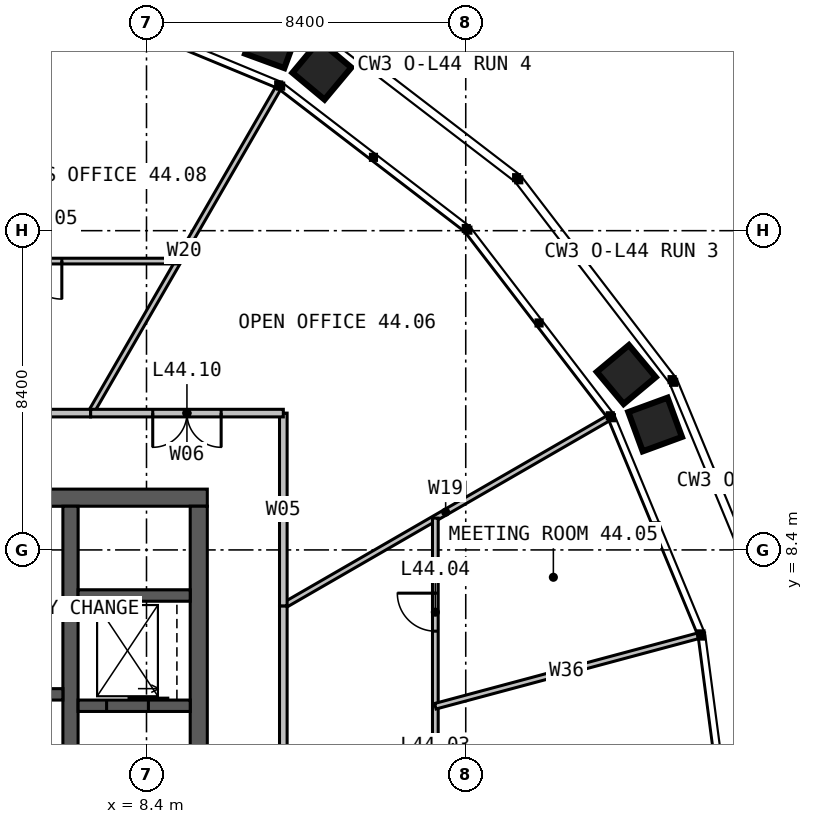
"""IFC4 building model, lengths in metres.
Left out: names, types, materials, properties, quantities, classifications, styles, units other than length and angle.
Written with IfcOpenShell. Run it as: python <this file> out.ifc"""

import sys

from ifc_helpers import new_model, si_unit, direction, frame, frame_2d, origin, place, context, subcontext, project, spatial, rectangle, extrude, element, fill, save


model = new_model("IFC4")
c1 = context("Model", 3, precision=1e-05, world=origin(), true_north=direction((0.0, 1.0)))
c2 = subcontext(c1, "Body", "Model", "MODEL_VIEW")
j1 = project(units=[si_unit("LENGTHUNIT", "METRE"), si_unit("PLANEANGLEUNIT", "RADIAN")], contexts=[c1])
p1 = place(None, origin())
s1 = spatial("IfcSite", under=j1, at=p1, CompositionType="ELEMENT")
p2 = place(p1, origin())
s2 = spatial("IfcBuilding", under=s1, at=p2, CompositionType="ELEMENT")
p3 = place(p2, frame((0.0, 0.0, 183.0)))
s3 = spatial("IfcBuildingStorey", under=s2, at=p3, CompositionType="ELEMENT", Elevation=183.0)
p4 = place(p3, frame((-10.0, 9.775, 0.0), z_axis=(0.0, 0.0, 1.0), x_axis=(1.0, 0.0, 0.0)))
e1 = element("IfcWall", 1, at=p4, inside=s3, PredefinedType="SOLIDWALL", context=c2, shape_type="SweptSolid", body=[
    extrude(rectangle(XDim=20.0, YDim=0.45, at=frame_2d((10.0, 0.0))), origin(), (0.0, 0.0, 1.0), 4.0),
])
p5 = place(p4, frame((9.4, 0.0, 0.0)))
e2 = element("IfcOpeningElement", 2, at=p5, cuts=e1, PredefinedType="OPENING", context=c2, shape_type="SweptSolid", body=[
    extrude(rectangle(XDim=1.2, YDim=2.2, at=frame_2d((0.6, 1.1))), frame((0.0, 0.235, 0.0), z_axis=(0.0, -1.0, 0.0), x_axis=(1.0, 0.0, 0.0)), (0.0, 0.0, 1.0), 0.47),
])
p6 = place(p3, frame((9.775, -9.55, 0.0), z_axis=(0.0, 0.0, 1.0), x_axis=(0.0, 1.0, 0.0)))
e3 = element("IfcWall", 3, at=p6, inside=s3, PredefinedType="SOLIDWALL", context=c2, shape_type="SweptSolid", body=[
    extrude(rectangle(XDim=19.1, YDim=0.45, at=frame_2d((9.55, 0.0))), origin(), (0.0, 0.0, 1.0), 4.0),
])
p7 = place(p3, frame((6.4, 9.55, 0.0), z_axis=(0.0, 0.0, 1.0), x_axis=(0.0, -1.0, 0.0)))
e4 = element("IfcWall", 4, at=p7, inside=s3, PredefinedType="SOLIDWALL", context=c2, shape_type="SweptSolid", body=[
    extrude(rectangle(XDim=19.1, YDim=0.4, at=frame_2d((9.55, 0.0))), origin(), (0.0, 0.0, 1.0), 4.0),
])
p8 = place(p7, frame((9.05, 0.0, 0.0)))
e5 = element("IfcOpeningElement", 5, at=p8, cuts=e4, PredefinedType="OPENING", context=c2, shape_type="SweptSolid", body=[
    extrude(rectangle(XDim=1.0, YDim=2.2, at=frame_2d((0.5, 1.1))), frame((0.0, 0.21, 0.0), z_axis=(0.0, -1.0, 0.0), x_axis=(1.0, 0.0, 0.0)), (0.0, 0.0, 1.0), 0.42),
])
p9 = place(p3, frame((1.35, 4.6, 0.0), z_axis=(0.0, 0.0, 1.0), x_axis=(1.0, 0.0, 0.0)))
e6 = element("IfcWall", 6, at=p9, inside=s3, PredefinedType="SOLIDWALL", context=c2, shape_type="SweptSolid", body=[
    extrude(rectangle(XDim=4.85, YDim=0.3, at=frame_2d((2.425, 0.0))), origin(), (0.0, 0.0, 1.0), 4.0),
])
p10 = place(p3, frame((6.6, 4.3, 0.0), z_axis=(0.0, 0.0, 1.0), x_axis=(1.0, 0.0, 0.0)))
e7 = element("IfcWall", 7, at=p10, inside=s3, PredefinedType="SOLIDWALL", context=c2, shape_type="SweptSolid", body=[
    extrude(rectangle(XDim=2.95, YDim=0.3, at=frame_2d((1.475, 0.0))), origin(), (0.0, 0.0, 1.0), 4.0),
])
p11 = place(p10, frame((0.75, 0.0, 0.0)))
e8 = element("IfcOpeningElement", 8, at=p11, cuts=e7, PredefinedType="OPENING", context=c2, shape_type="SweptSolid", body=[
    extrude(rectangle(XDim=1.1, YDim=2.2, at=frame_2d((0.55, 1.1))), frame((0.0, 0.16, 0.0), z_axis=(0.0, -1.0, 0.0), x_axis=(1.0, 0.0, 0.0)), (0.0, 0.0, 1.0), 0.32),
])
p12 = place(p3, frame((6.6, 7.2, 0.0), z_axis=(0.0, 0.0, 1.0), x_axis=(1.0, 0.0, 0.0)))
e9 = element("IfcWall", 9, at=p12, inside=s3, PredefinedType="SOLIDWALL", context=c2, shape_type="SweptSolid", body=[
    extrude(rectangle(XDim=2.95, YDim=0.3, at=frame_2d((1.475, 0.0))), origin(), (0.0, 0.0, 1.0), 4.0),
])
p13 = place(p3, frame((1.35, 6.8, 0.0), z_axis=(0.0, 0.0, 1.0), x_axis=(1.0, 0.0, 0.0)))
e10 = element("IfcWall", 10, at=p13, inside=s3, PredefinedType="PARTITIONING", context=c2, shape_type="SweptSolid", body=[
    extrude(rectangle(XDim=4.85, YDim=0.15, at=frame_2d((2.425, 0.0))), origin(), (0.0, 0.0, 1.0), 3.75),
])
for number, where, z_axis, x_axis in (
    (11, (12.0, 6.928, 0.0), (0.0, 0.0, 1.0), (0.866, 0.5, 0.0)),
    (12, (6.928, 12.0, 0.0), (0.0, 0.0, 1.0), (0.5, 0.866, 0.0)),
):
    element("IfcWall", number, at=place(p3, frame(where, z_axis=z_axis, x_axis=x_axis)), inside=s3, PredefinedType="PARTITIONING", context=c2, shape_type="SweptSolid", body=[
        extrude(rectangle(XDim=9.865, YDim=0.15, at=frame_2d((4.932, 0.0))), origin(), (0.0, 0.0, 1.0), 2.79),
    ])
p14 = place(p3, frame((16.0, -9.238, 0.0), z_axis=(0.0, 0.0, 1.0), x_axis=(0.0, 1.0, 0.0)))
e13 = element("IfcWall", 13, at=p14, inside=s3, PredefinedType="PARTITIONING", context=c2, shape_type="SweptSolid", body=[
    extrude(rectangle(XDim=18.475, YDim=0.15, at=frame_2d((9.238, 0.0))), origin(), (0.0, 0.0, 1.0), 2.79),
])
p15 = place(p14, frame((1.975, 0.0, 0.0)))
e14 = element("IfcOpeningElement", 14, at=p15, cuts=e13, PredefinedType="OPENING", context=c2, shape_type="SweptSolid", body=[
    extrude(rectangle(XDim=1.0, YDim=2.2, at=frame_2d((0.5, 1.1))), frame((0.0, 0.085, 0.0), z_axis=(0.0, -1.0, 0.0), x_axis=(1.0, 0.0, 0.0)), (0.0, 0.0, 1.0), 0.17),
])
p16 = place(p14, frame((6.594, 0.0, 0.0)))
e15 = element("IfcOpeningElement", 15, at=p16, cuts=e13, PredefinedType="OPENING", context=c2, shape_type="SweptSolid", body=[
    extrude(rectangle(XDim=1.0, YDim=2.2, at=frame_2d((0.5, 1.1))), frame((0.0, 0.085, 0.0), z_axis=(0.0, -1.0, 0.0), x_axis=(1.0, 0.0, 0.0)), (0.0, 0.0, 1.0), 0.17),
])
p17 = place(p14, frame((10.881, 0.0, 0.0)))
e16 = element("IfcOpeningElement", 16, at=p17, cuts=e13, PredefinedType="OPENING", context=c2, shape_type="SweptSolid", body=[
    extrude(rectangle(XDim=1.0, YDim=2.2, at=frame_2d((0.5, 1.1))), frame((0.0, 0.085, 0.0), z_axis=(0.0, -1.0, 0.0), x_axis=(1.0, 0.0, 0.0)), (0.0, 0.0, 1.0), 0.17),
])
p18 = place(p14, frame((15.5, 0.0, 0.0)))
e17 = element("IfcOpeningElement", 17, at=p18, cuts=e13, PredefinedType="OPENING", context=c2, shape_type="SweptSolid", body=[
    extrude(rectangle(XDim=1.0, YDim=2.2, at=frame_2d((0.5, 1.1))), frame((0.0, 0.085, 0.0), z_axis=(0.0, -1.0, 0.0), x_axis=(1.0, 0.0, 0.0)), (0.0, 0.0, 1.0), 0.17),
])
p19 = place(p3, frame((16.0, 4.287, 0.0), z_axis=(0.0, 0.0, 1.0), x_axis=(0.965925667522, 0.25881963763, 0.0)))
e18 = element("IfcWall", 18, at=p19, inside=s3, PredefinedType="PARTITIONING", context=c2, shape_type="SweptSolid", body=[
    extrude(rectangle(XDim=7.157, YDim=0.15, at=frame_2d((3.578, 0.0))), origin(), (0.0, 0.0, 1.0), 2.79),
])
p20 = place(p3, frame((12.0, -6.928, 0.0), z_axis=(0.0, 0.0, 1.0), x_axis=(0.0, 1.0, 0.0)))
e19 = element("IfcWall", 19, at=p20, inside=s3, PredefinedType="PARTITIONING", context=c2, shape_type="SweptSolid", body=[
    extrude(rectangle(XDim=13.856, YDim=0.2, at=frame_2d((6.928, 0.0))), origin(), (0.0, 0.0, 1.0), 3.8),
])
p21 = place(p20, frame((6.028, 0.0, 0.0)))
e20 = element("IfcOpeningElement", 20, at=p21, cuts=e19, PredefinedType="OPENING", context=c2, shape_type="SweptSolid", body=[
    extrude(rectangle(XDim=1.8, YDim=2.2, at=frame_2d((0.9, 1.1))), frame((0.0, 0.11, 0.0), z_axis=(0.0, -1.0, 0.0), x_axis=(1.0, 0.0, 0.0)), (0.0, 0.0, 1.0), 0.22),
])
p22 = place(p3, frame((12.0, 6.928, 0.0), z_axis=(0.0, 0.0, 1.0), x_axis=(0.0, 1.0, 0.0)))
e21 = element("IfcWall", 21, at=p22, inside=s3, PredefinedType="PARTITIONING", context=c2, shape_type="SweptSolid", body=[
    extrude(rectangle(XDim=5.072, YDim=0.2, at=frame_2d((2.536, 0.0))), origin(), (0.0, 0.0, 1.0), 3.8),
])
p23 = place(p3, frame((12.0, 12.0, 0.0), z_axis=(0.0, 0.0, 1.0), x_axis=(-1.0, 0.0, 0.0)))
e22 = element("IfcWall", 22, at=p23, inside=s3, PredefinedType="PARTITIONING", context=c2, shape_type="SweptSolid", body=[
    extrude(rectangle(XDim=5.072, YDim=0.2, at=frame_2d((2.536, 0.0))), origin(), (0.0, 0.0, 1.0), 3.8),
])
p24 = place(p23, frame((1.636, 0.0, 0.0)))
e23 = element("IfcOpeningElement", 23, at=p24, cuts=e22, PredefinedType="OPENING", context=c2, shape_type="SweptSolid", body=[
    extrude(rectangle(XDim=1.8, YDim=2.2, at=frame_2d((0.9, 1.1))), frame((0.0, 0.11, 0.0), z_axis=(0.0, -1.0, 0.0), x_axis=(1.0, 0.0, 0.0)), (0.0, 0.0, 1.0), 0.22),
])
p25 = place(p3, frame((9.238, 16.0, 0.0), z_axis=(0.0, 0.0, 1.0), x_axis=(-1.0, 0.0, 0.0)))
e24 = element("IfcWall", 24, at=p25, inside=s3, PredefinedType="PARTITIONING", context=c2, shape_type="SweptSolid", body=[
    extrude(rectangle(XDim=13.525, YDim=0.15, at=frame_2d((6.762, 0.0))), origin(), (0.0, 0.0, 1.0), 2.79),
])
p26 = place(p25, frame((3.066, 0.0, 0.0)))
e25 = element("IfcOpeningElement", 25, at=p26, cuts=e24, PredefinedType="OPENING", context=c2, shape_type="SweptSolid", body=[
    extrude(rectangle(XDim=1.0, YDim=2.2, at=frame_2d((0.5, 1.1))), frame((0.0, 0.085, 0.0), z_axis=(0.0, -1.0, 0.0), x_axis=(1.0, 0.0, 0.0)), (0.0, 0.0, 1.0), 0.17),
])
p27 = place(p25, frame((7.684, 0.0, 0.0)))
e26 = element("IfcOpeningElement", 26, at=p27, cuts=e24, PredefinedType="OPENING", context=c2, shape_type="SweptSolid", body=[
    extrude(rectangle(XDim=1.0, YDim=2.2, at=frame_2d((0.5, 1.1))), frame((0.0, 0.085, 0.0), z_axis=(0.0, -1.0, 0.0), x_axis=(1.0, 0.0, 0.0)), (0.0, 0.0, 1.0), 0.17),
])
p28 = place(p25, frame((9.791, 0.0, 0.0)))
e27 = element("IfcOpeningElement", 27, at=p28, cuts=e24, PredefinedType="OPENING", context=c2, shape_type="SweptSolid", body=[
    extrude(rectangle(XDim=1.0, YDim=2.2, at=frame_2d((0.5, 1.1))), frame((0.0, 0.085, 0.0), z_axis=(0.0, -1.0, 0.0), x_axis=(1.0, 0.0, 0.0)), (0.0, 0.0, 1.0), 0.17),
])
p29 = place(p25, frame((11.934, 0.0, 0.0)))
e28 = element("IfcOpeningElement", 28, at=p29, cuts=e24, PredefinedType="OPENING", context=c2, shape_type="SweptSolid", body=[
    extrude(rectangle(XDim=1.0, YDim=2.2, at=frame_2d((0.5, 1.1))), frame((0.0, 0.085, 0.0), z_axis=(0.0, -1.0, 0.0), x_axis=(1.0, 0.0, 0.0)), (0.0, 0.0, 1.0), 0.17),
])
p30 = place(p3, frame((6.928, 12.0, 0.0), z_axis=(0.0, 0.0, 1.0), x_axis=(-1.0, 0.0, 0.0)))
e29 = element("IfcWall", 29, at=p30, inside=s3, PredefinedType="PARTITIONING", context=c2, shape_type="SweptSolid", body=[
    extrude(rectangle(XDim=10.144, YDim=0.2, at=frame_2d((5.072, 0.0))), origin(), (0.0, 0.0, 1.0), 3.8),
])
p31 = place(p30, frame((4.172, 0.0, 0.0)))
e30 = element("IfcOpeningElement", 30, at=p31, cuts=e29, PredefinedType="OPENING", context=c2, shape_type="SweptSolid", body=[
    extrude(rectangle(XDim=1.8, YDim=2.2, at=frame_2d((0.9, 1.1))), frame((0.0, 0.11, 0.0), z_axis=(0.0, -1.0, 0.0), x_axis=(1.0, 0.0, 0.0)), (0.0, 0.0, 1.0), 0.22),
])
p32 = place(p11, origin())
e31 = element("IfcDoor", 31, at=p32, inside=s3, OperationType="SLIDING_TO_LEFT", PredefinedType="DOOR", context=c2, shape_type="SweptSolid", body=[
    extrude(rectangle(XDim=1.1, YDim=2.2, at=frame_2d((0.55, 1.1))), frame((0.0, 0.025, 0.0), z_axis=(0.0, -1.0, 0.0), x_axis=(1.0, 0.0, 0.0)), (0.0, 0.0, 1.0), 0.05),
])
fill(e8, e31)
p33 = place(p18, origin())
e32 = element("IfcDoor", 32, at=p33, inside=s3, OperationType="SINGLE_SWING_RIGHT", PredefinedType="DOOR", context=c2, shape_type="SweptSolid", body=[
    extrude(rectangle(XDim=1.0, YDim=2.2, at=frame_2d((0.5, 1.1))), frame((0.0, 0.025, 0.0), z_axis=(0.0, -1.0, 0.0), x_axis=(1.0, 0.0, 0.0)), (0.0, 0.0, 1.0), 0.05),
])
fill(e17, e32)
p34 = place(p24, origin())
e33 = element("IfcDoor", 33, at=p34, inside=s3, OperationType="DOUBLE_DOOR_SINGLE_SWING", PredefinedType="DOOR", context=c2, shape_type="SweptSolid", body=[
    extrude(rectangle(XDim=1.8, YDim=2.2, at=frame_2d((0.9, 1.1))), frame((0.0, 0.025, 0.0), z_axis=(0.0, -1.0, 0.0), x_axis=(1.0, 0.0, 0.0)), (0.0, 0.0, 1.0), 0.05),
])
fill(e23, e33)
p35 = place(p26, origin())
e34 = element("IfcDoor", 34, at=p35, inside=s3, OperationType="SINGLE_SWING_LEFT", PredefinedType="DOOR", context=c2, shape_type="SweptSolid", body=[
    extrude(rectangle(XDim=1.0, YDim=2.2, at=frame_2d((0.5, 1.1))), frame((0.0, 0.025, 0.0), z_axis=(0.0, -1.0, 0.0), x_axis=(1.0, 0.0, 0.0)), (0.0, 0.0, 1.0), 0.05),
])
fill(e25, e34)
save(model, sys.argv[1])
